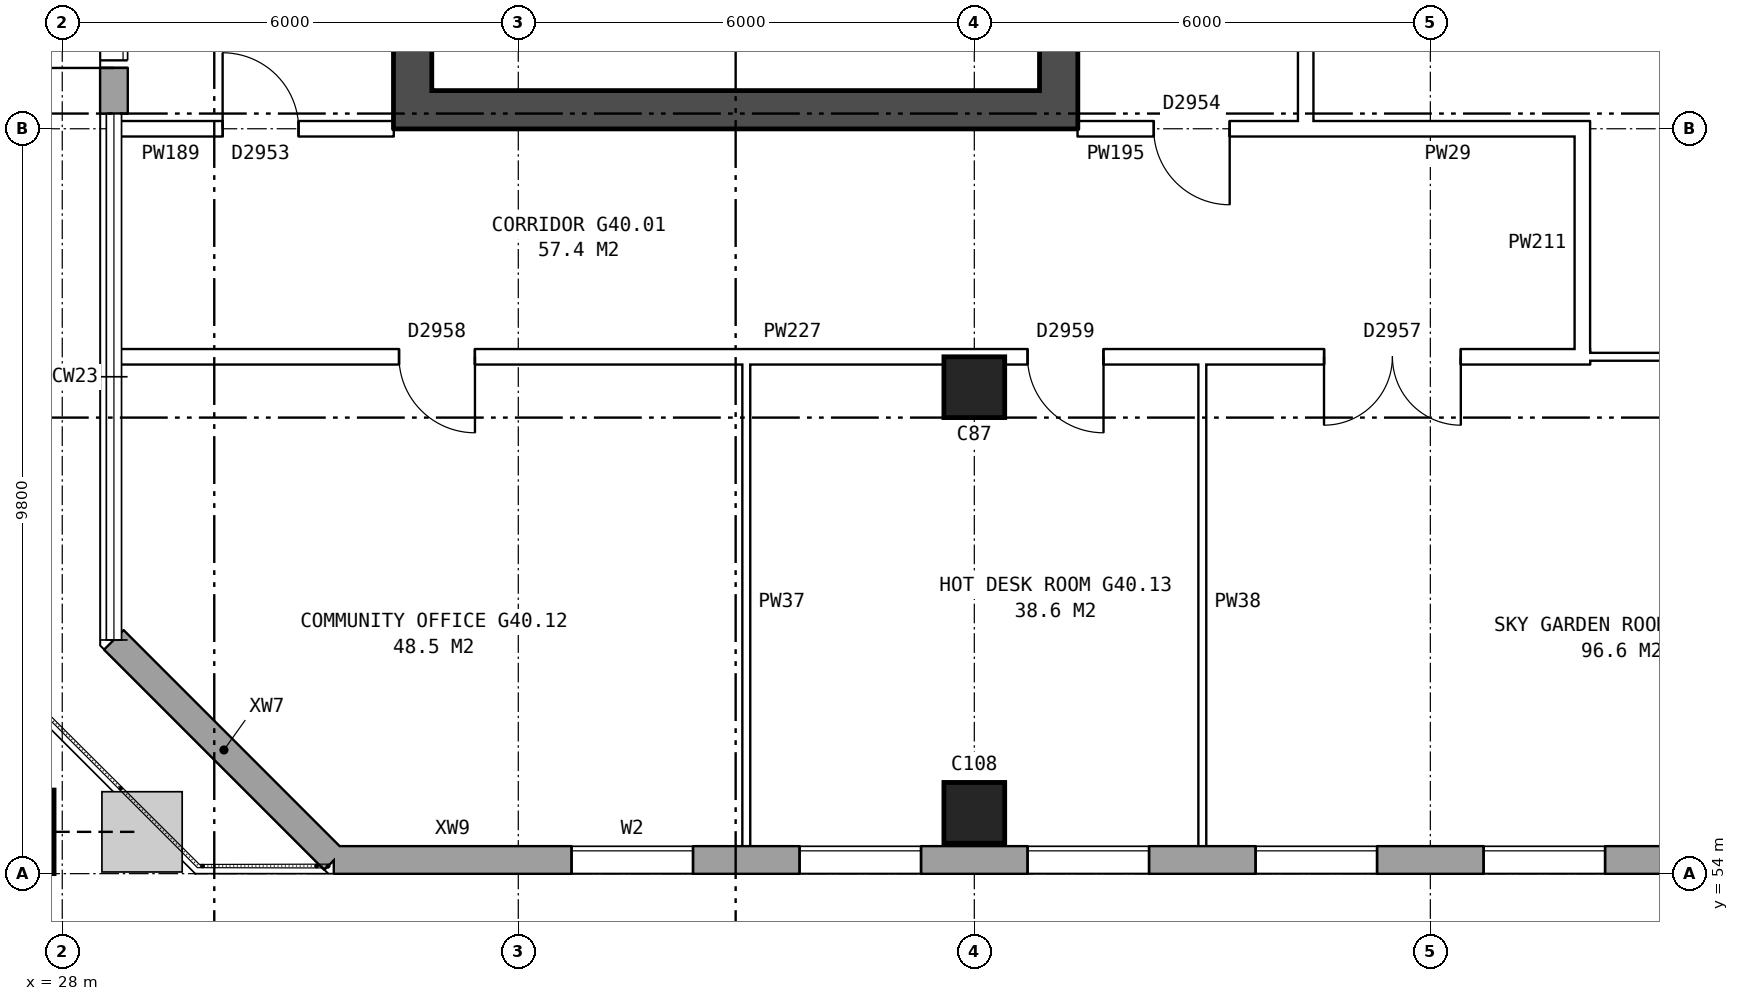
"""IFC4 building model, lengths in metres.
Left out: names, types, materials, properties, quantities, classifications, styles, units other than length and angle.
Written with IfcOpenShell. Run it as: python <this file> out.ifc"""

import sys

from ifc_helpers import new_model, si_unit, direction, frame, frame_2d, origin, origin_2d, place, context, subcontext, project, spatial, rectangle, hollow_rectangle, extrude, element, fill, save


model = new_model("IFC4")
c1 = context("Model", 3, precision=1e-05, world=origin(), true_north=direction((0.0, 1.0)))
c2 = subcontext(c1, "Body", "Model", "MODEL_VIEW")
j1 = project(units=[si_unit("LENGTHUNIT", "METRE"), si_unit("PLANEANGLEUNIT", "RADIAN")], contexts=[c1])
p1 = place(None, origin())
s1 = spatial("IfcSite", under=j1, at=p1, CompositionType="ELEMENT")
p2 = place(p1, origin())
s2 = spatial("IfcBuilding", under=s1, at=p2, CompositionType="ELEMENT")
p3 = place(p2, frame((0.0, 0.0, 142.3)))
s3 = spatial("IfcBuildingStorey", under=s2, at=p3, CompositionType="ELEMENT", Elevation=142.3)
for number, where, z_axis, x_axis in (
    (1, (40.0, 54.8, 0.0), (0.0, 0.0, 1.0), (1.0, 0.0, 0.0)),
    (2, (40.0, 60.4, 0.0), (0.0, 0.0, 1.0), (1.0, 0.0, 0.0)),
):
    element("IfcColumn", number, at=place(p3, frame(where, z_axis=z_axis, x_axis=x_axis)), inside=s3, PredefinedType="COLUMN", context=c2, shape_type="SweptSolid", body=[
        extrude(rectangle(XDim=0.8, YDim=0.8, at=origin_2d()), origin(), (0.0, 0.0, 1.0), 5.6),
    ])
p4 = place(p3, frame((27.342, 54.55, 0.149), z_axis=(0.27162754988, 0.0, 0.962402449158), x_axis=(0.0, 1.0, 0.0)))
e3 = element("IfcColumn", 3, at=p4, inside=s3, PredefinedType="COLUMN", context=c2, shape_type="SweptSolid", body=[
    extrude(hollow_rectangle(XDim=1.1, YDim=1.1, WallThickness=0.06, at=origin_2d()), origin(), (0.0, 0.0, 1.0), 6.132),
])
p5 = place(p3, frame((28.68, 57.075, 0.0), z_axis=(0.0, 0.0, 1.0), x_axis=(0.707106781187, -0.707106781187, 0.0)))
e4 = element("IfcWall", 4, at=p5, inside=s3, PredefinedType="STANDARD", context=c2, shape_type="SweptSolid", body=[
    extrude(rectangle(XDim=4.094, YDim=0.36, at=frame_2d((2.047, 0.0))), origin(), (0.0, 0.0, 1.0), 5.6),
])
p6 = place(p3, frame((31.575, 54.18, 0.0), z_axis=(0.0, 0.0, 1.0), x_axis=(1.0, 0.0, 0.0)))
e5 = element("IfcWall", 5, at=p6, inside=s3, PredefinedType="STANDARD", context=c2, shape_type="SweptSolid", body=[
    extrude(rectangle(XDim=41.351, YDim=0.36, at=frame_2d((20.675, 0.0))), origin(), (0.0, 0.0, 1.0), 5.6),
])
p7 = place(p6, frame((3.125, 0.0, 0.15)))
e6 = element("IfcOpeningElement", 6, at=p7, cuts=e5, PredefinedType="OPENING", context=c2, shape_type="SweptSolid", body=[
    extrude(rectangle(XDim=1.6, YDim=2.4, at=frame_2d((0.8, 1.2))), frame((0.0, 0.19, 0.0), z_axis=(0.0, -1.0, 0.0), x_axis=(1.0, 0.0, 0.0)), (0.0, 0.0, 1.0), 0.38),
])
p8 = place(p6, frame((6.125, 0.0, 0.15)))
e7 = element("IfcOpeningElement", 7, at=p8, cuts=e5, PredefinedType="OPENING", context=c2, shape_type="SweptSolid", body=[
    extrude(rectangle(XDim=1.6, YDim=2.4, at=frame_2d((0.8, 1.2))), frame((0.0, 0.19, 0.0), z_axis=(0.0, -1.0, 0.0), x_axis=(1.0, 0.0, 0.0)), (0.0, 0.0, 1.0), 0.38),
])
p9 = place(p6, frame((9.125, 0.0, 0.15)))
e8 = element("IfcOpeningElement", 8, at=p9, cuts=e5, PredefinedType="OPENING", context=c2, shape_type="SweptSolid", body=[
    extrude(rectangle(XDim=1.6, YDim=2.4, at=frame_2d((0.8, 1.2))), frame((0.0, 0.19, 0.0), z_axis=(0.0, -1.0, 0.0), x_axis=(1.0, 0.0, 0.0)), (0.0, 0.0, 1.0), 0.38),
])
p10 = place(p6, frame((12.125, 0.0, 0.15)))
e9 = element("IfcOpeningElement", 9, at=p10, cuts=e5, PredefinedType="OPENING", context=c2, shape_type="SweptSolid", body=[
    extrude(rectangle(XDim=1.6, YDim=2.4, at=frame_2d((0.8, 1.2))), frame((0.0, 0.19, 0.0), z_axis=(0.0, -1.0, 0.0), x_axis=(1.0, 0.0, 0.0)), (0.0, 0.0, 1.0), 0.38),
])
p11 = place(p6, frame((15.125, 0.0, 0.15)))
e10 = element("IfcOpeningElement", 10, at=p11, cuts=e5, PredefinedType="OPENING", context=c2, shape_type="SweptSolid", body=[
    extrude(rectangle(XDim=1.6, YDim=2.4, at=frame_2d((0.8, 1.2))), frame((0.0, 0.19, 0.0), z_axis=(0.0, -1.0, 0.0), x_axis=(1.0, 0.0, 0.0)), (0.0, 0.0, 1.0), 0.38),
])
p12 = place(p6, frame((18.125, 0.0, 0.15)))
e11 = element("IfcOpeningElement", 11, at=p12, cuts=e5, PredefinedType="OPENING", context=c2, shape_type="SweptSolid", body=[
    extrude(rectangle(XDim=1.6, YDim=2.4, at=frame_2d((0.8, 1.2))), frame((0.0, 0.19, 0.0), z_axis=(0.0, -1.0, 0.0), x_axis=(1.0, 0.0, 0.0)), (0.0, 0.0, 1.0), 0.38),
])
p13 = place(p6, frame((21.125, 0.0, 0.15)))
e12 = element("IfcOpeningElement", 12, at=p13, cuts=e5, PredefinedType="OPENING", context=c2, shape_type="SweptSolid", body=[
    extrude(rectangle(XDim=1.6, YDim=2.4, at=frame_2d((0.8, 1.2))), frame((0.0, 0.19, 0.0), z_axis=(0.0, -1.0, 0.0), x_axis=(1.0, 0.0, 0.0)), (0.0, 0.0, 1.0), 0.38),
])
p14 = place(p6, frame((24.125, 0.0, 0.15)))
e13 = element("IfcOpeningElement", 13, at=p14, cuts=e5, PredefinedType="OPENING", context=c2, shape_type="SweptSolid", body=[
    extrude(rectangle(XDim=1.6, YDim=2.4, at=frame_2d((0.8, 1.2))), frame((0.0, 0.19, 0.0), z_axis=(0.0, -1.0, 0.0), x_axis=(1.0, 0.0, 0.0)), (0.0, 0.0, 1.0), 0.38),
])
p15 = place(p6, frame((27.125, 0.0, 0.15)))
e14 = element("IfcOpeningElement", 14, at=p15, cuts=e5, PredefinedType="OPENING", context=c2, shape_type="SweptSolid", body=[
    extrude(rectangle(XDim=1.6, YDim=2.4, at=frame_2d((0.8, 1.2))), frame((0.0, 0.19, 0.0), z_axis=(0.0, -1.0, 0.0), x_axis=(1.0, 0.0, 0.0)), (0.0, 0.0, 1.0), 0.38),
])
p16 = place(p6, frame((30.125, 0.0, 0.15)))
e15 = element("IfcOpeningElement", 15, at=p16, cuts=e5, PredefinedType="OPENING", context=c2, shape_type="SweptSolid", body=[
    extrude(rectangle(XDim=1.6, YDim=2.4, at=frame_2d((0.8, 1.2))), frame((0.0, 0.19, 0.0), z_axis=(0.0, -1.0, 0.0), x_axis=(1.0, 0.0, 0.0)), (0.0, 0.0, 1.0), 0.38),
])
p17 = place(p6, frame((33.125, 0.0, 0.15)))
e16 = element("IfcOpeningElement", 16, at=p17, cuts=e5, PredefinedType="OPENING", context=c2, shape_type="SweptSolid", body=[
    extrude(rectangle(XDim=1.6, YDim=2.4, at=frame_2d((0.8, 1.2))), frame((0.0, 0.19, 0.0), z_axis=(0.0, -1.0, 0.0), x_axis=(1.0, 0.0, 0.0)), (0.0, 0.0, 1.0), 0.38),
])
p18 = place(p6, frame((36.125, 0.0, 0.15)))
e17 = element("IfcOpeningElement", 17, at=p18, cuts=e5, PredefinedType="OPENING", context=c2, shape_type="SweptSolid", body=[
    extrude(rectangle(XDim=1.6, YDim=2.4, at=frame_2d((0.8, 1.2))), frame((0.0, 0.19, 0.0), z_axis=(0.0, -1.0, 0.0), x_axis=(1.0, 0.0, 0.0)), (0.0, 0.0, 1.0), 0.38),
])
p19 = place(p6, frame((39.125, 0.0, 0.15)))
e18 = element("IfcOpeningElement", 18, at=p19, cuts=e5, PredefinedType="OPENING", context=c2, shape_type="SweptSolid", body=[
    extrude(rectangle(XDim=1.6, YDim=2.4, at=frame_2d((0.8, 1.2))), frame((0.0, 0.19, 0.0), z_axis=(0.0, -1.0, 0.0), x_axis=(1.0, 0.0, 0.0)), (0.0, 0.0, 1.0), 0.38),
])
p20 = place(p3, frame((28.68, 67.0, 0.0), z_axis=(0.0, 0.0, 1.0), x_axis=(0.0, -1.0, 0.0)))
e19 = element("IfcWall", 19, at=p20, inside=s3, PredefinedType="STANDARD", context=c2, shape_type="SweptSolid", body=[
    extrude(rectangle(XDim=3.0, YDim=0.36, at=frame_2d((1.5, 0.0))), origin(), (0.0, 0.0, 1.0), 5.6),
])
p21 = place(p20, frame((0.7, 0.0, 3.4)))
e20 = element("IfcOpeningElement", 20, at=p21, cuts=e19, PredefinedType="OPENING", context=c2, shape_type="SweptSolid", body=[
    extrude(rectangle(XDim=1.6, YDim=1.2, at=frame_2d((0.8, 0.6))), frame((0.0, 0.19, 0.0), z_axis=(0.0, -1.0, 0.0), x_axis=(1.0, 0.0, 0.0)), (0.0, 0.0, 1.0), 0.38),
])
p22 = place(p20, frame((0.6, 0.0, 0.0)))
e21 = element("IfcOpeningElement", 21, at=p22, cuts=e19, PredefinedType="OPENING", context=c2, shape_type="SweptSolid", body=[
    extrude(rectangle(XDim=1.8, YDim=2.4, at=frame_2d((0.9, 1.2))), frame((0.0, 0.19, 0.0), z_axis=(0.0, -1.0, 0.0), x_axis=(1.0, 0.0, 0.0)), (0.0, 0.0, 1.0), 0.38),
])
p23 = place(p3, frame((41.11, 76.2, 0.0), z_axis=(0.0, 0.0, 1.0), x_axis=(0.0, -1.0, 0.0)))
e22 = element("IfcWall", 22, at=p23, inside=s3, PredefinedType="SHEAR", context=c2, shape_type="SweptSolid", body=[
    extrude(rectangle(XDim=12.4, YDim=0.5, at=frame_2d((6.2, 0.0))), origin(), (0.0, 0.0, 1.0), 5.6),
])
p24 = place(p23, frame((1.325, 0.0, 0.0)))
e23 = element("IfcOpeningElement", 23, at=p24, cuts=e22, PredefinedType="OPENING", context=c2, shape_type="SweptSolid", body=[
    extrude(rectangle(XDim=1.1, YDim=2.1, at=frame_2d((0.55, 1.05))), frame((0.0, 0.26, 0.0), z_axis=(0.0, -1.0, 0.0), x_axis=(1.0, 0.0, 0.0)), (0.0, 0.0, 1.0), 0.52),
])
p25 = place(p23, frame((5.925, 0.0, 0.0)))
e24 = element("IfcOpeningElement", 24, at=p25, cuts=e22, PredefinedType="OPENING", context=c2, shape_type="SweptSolid", body=[
    extrude(rectangle(XDim=0.85, YDim=2.1, at=frame_2d((0.425, 1.05))), frame((0.0, 0.26, 0.0), z_axis=(0.0, -1.0, 0.0), x_axis=(1.0, 0.0, 0.0)), (0.0, 0.0, 1.0), 0.52),
])
p26 = place(p23, frame((9.9, 0.0, 0.0)))
e25 = element("IfcOpeningElement", 25, at=p26, cuts=e22, PredefinedType="OPENING", context=c2, shape_type="SweptSolid", body=[
    extrude(rectangle(XDim=1.1, YDim=2.1, at=frame_2d((0.55, 1.05))), frame((0.0, 0.26, 0.0), z_axis=(0.0, -1.0, 0.0), x_axis=(1.0, 0.0, 0.0)), (0.0, 0.0, 1.0), 0.52),
])
p27 = place(p3, frame((32.61, 76.2, 0.0), z_axis=(0.0, 0.0, 1.0), x_axis=(0.0, -1.0, 0.0)))
e26 = element("IfcWall", 26, at=p27, inside=s3, PredefinedType="SHEAR", context=c2, shape_type="SweptSolid", body=[
    extrude(rectangle(XDim=12.4, YDim=0.5, at=frame_2d((6.2, 0.0))), origin(), (0.0, 0.0, 1.0), 5.6),
])
p28 = place(p3, frame((40.86, 64.05, 0.0), z_axis=(0.0, 0.0, 1.0), x_axis=(-1.0, 0.0, 0.0)))
e27 = element("IfcWall", 27, at=p28, inside=s3, PredefinedType="SHEAR", context=c2, shape_type="SweptSolid", body=[
    extrude(rectangle(XDim=8.0, YDim=0.5, at=frame_2d((4.0, 0.0))), origin(), (0.0, 0.0, 1.0), 5.6),
])
p29 = place(p3, frame((44.36, 63.9, 0.0), z_axis=(0.0, 0.0, 1.0), x_axis=(0.0, 1.0, 0.0)))
e28 = element("IfcWall", 28, at=p29, inside=s3, PredefinedType="PARTITIONING", context=c2, shape_type="SweptSolid", body=[
    extrude(rectangle(XDim=12.2, YDim=0.2, at=frame_2d((6.1, 0.0))), origin(), (0.0, 0.0, 1.0), 5.6),
])
p30 = place(p29, frame((5.1, 0.0, 0.0)))
e29 = element("IfcOpeningElement", 29, at=p30, cuts=e28, PredefinedType="OPENING", context=c2, shape_type="SweptSolid", body=[
    extrude(rectangle(XDim=2.0, YDim=2.1, at=frame_2d((1.0, 1.05))), frame((0.0, 0.11, 0.0), z_axis=(0.0, -1.0, 0.0), x_axis=(1.0, 0.0, 0.0)), (0.0, 0.0, 1.0), 0.22),
])
p31 = place(p3, frame((28.74, 60.8, 0.0), z_axis=(0.0, 0.0, 1.0), x_axis=(1.0, 0.0, 0.0)))
e30 = element("IfcWall", 30, at=p31, inside=s3, PredefinedType="PARTITIONING", context=c2, shape_type="SweptSolid", body=[
    extrude(rectangle(XDim=19.362, YDim=0.2, at=frame_2d((9.681, 0.0))), origin(), (0.0, 0.0, 1.0), 5.6),
])
p32 = place(p31, frame((3.69, 0.0, 0.0)))
e31 = element("IfcOpeningElement", 31, at=p32, cuts=e30, PredefinedType="OPENING", context=c2, shape_type="SweptSolid", body=[
    extrude(rectangle(XDim=1.0, YDim=2.1, at=frame_2d((0.5, 1.05))), frame((0.0, 0.11, 0.0), z_axis=(0.0, -1.0, 0.0), x_axis=(1.0, 0.0, 0.0)), (0.0, 0.0, 1.0), 0.22),
])
p33 = place(p31, frame((11.96, 0.0, 0.0)))
e32 = element("IfcOpeningElement", 32, at=p33, cuts=e30, PredefinedType="OPENING", context=c2, shape_type="SweptSolid", body=[
    extrude(rectangle(XDim=1.0, YDim=2.1, at=frame_2d((0.5, 1.05))), frame((0.0, 0.11, 0.0), z_axis=(0.0, -1.0, 0.0), x_axis=(1.0, 0.0, 0.0)), (0.0, 0.0, 1.0), 0.22),
])
p34 = place(p31, frame((15.861, 0.0, 0.0)))
e33 = element("IfcOpeningElement", 33, at=p34, cuts=e30, PredefinedType="OPENING", context=c2, shape_type="SweptSolid", body=[
    extrude(rectangle(XDim=1.8, YDim=2.1, at=frame_2d((0.9, 1.05))), frame((0.0, 0.11, 0.0), z_axis=(0.0, -1.0, 0.0), x_axis=(1.0, 0.0, 0.0)), (0.0, 0.0, 1.0), 0.22),
])
p35 = place(p3, frame((47.9, 60.8, 0.0), z_axis=(0.0, 0.0, 1.0), x_axis=(1.0, 0.0, 0.0)))
e34 = element("IfcWall", 34, at=p35, inside=s3, PredefinedType="PARTITIONING", context=c2, shape_type="SweptSolid", body=[
    extrude(rectangle(XDim=10.15, YDim=0.1, at=frame_2d((5.075, 0.0))), origin(), (0.0, 0.0, 1.0), 5.6),
])
p36 = place(p35, frame((4.8, 0.0, 0.0)))
e35 = element("IfcOpeningElement", 35, at=p36, cuts=e34, PredefinedType="OPENING", context=c2, shape_type="SweptSolid", body=[
    extrude(rectangle(XDim=1.0, YDim=2.1, at=frame_2d((0.5, 1.05))), frame((0.0, 0.06, 0.0), z_axis=(0.0, -1.0, 0.0), x_axis=(1.0, 0.0, 0.0)), (0.0, 0.0, 1.0), 0.12),
])
p37 = place(p3, frame((28.74, 63.8, 0.0), z_axis=(0.0, 0.0, 1.0), x_axis=(1.0, 0.0, 0.0)))
e36 = element("IfcWall", 36, at=p37, inside=s3, PredefinedType="PARTITIONING", context=c2, shape_type="SweptSolid", body=[
    extrude(rectangle(XDim=3.62, YDim=0.2, at=frame_2d((1.81, 0.0))), origin(), (0.0, 0.0, 1.0), 5.6),
])
p38 = place(p37, frame((1.37, 0.0, 0.0)))
e37 = element("IfcOpeningElement", 37, at=p38, cuts=e36, PredefinedType="OPENING", context=c2, shape_type="SweptSolid", body=[
    extrude(rectangle(XDim=1.0, YDim=2.1, at=frame_2d((0.5, 1.05))), frame((0.0, 0.11, 0.0), z_axis=(0.0, -1.0, 0.0), x_axis=(1.0, 0.0, 0.0)), (0.0, 0.0, 1.0), 0.22),
])
p39 = place(p3, frame((44.36, 63.8, 0.0), z_axis=(0.0, 0.0, 1.0), x_axis=(1.0, 0.0, 0.0)))
e38 = element("IfcWall", 38, at=p39, inside=s3, PredefinedType="PARTITIONING", context=c2, shape_type="SweptSolid", body=[
    extrude(rectangle(XDim=3.74, YDim=0.2, at=frame_2d((1.87, 0.0))), origin(), (0.0, 0.0, 1.0), 5.6),
])
p40 = place(p3, frame((41.36, 63.8, 0.0), z_axis=(0.0, 0.0, 1.0), x_axis=(1.0, 0.0, 0.0)))
e39 = element("IfcWall", 39, at=p40, inside=s3, PredefinedType="PARTITIONING", context=c2, shape_type="SweptSolid", body=[
    extrude(rectangle(XDim=3.0, YDim=0.2, at=frame_2d((1.5, 0.0))), origin(), (0.0, 0.0, 1.0), 5.6),
])
p41 = place(p40, frame((1.0, 0.0, 0.0)))
e40 = element("IfcOpeningElement", 40, at=p41, cuts=e39, PredefinedType="OPENING", context=c2, shape_type="SweptSolid", body=[
    extrude(rectangle(XDim=1.0, YDim=2.1, at=frame_2d((0.5, 1.05))), frame((0.0, 0.11, 0.0), z_axis=(0.0, -1.0, 0.0), x_axis=(1.0, 0.0, 0.0)), (0.0, 0.0, 1.0), 0.22),
])
for number, where, z_axis, x_axis in (
    (41, (37.0, 54.24, 0.0), (0.0, 0.0, 1.0), (0.0, 1.0, 0.0)),
    (42, (43.0, 54.24, 0.0), (0.0, 0.0, 1.0), (0.0, 1.0, 0.0)),
):
    element("IfcWall", number, at=place(p3, frame(where, z_axis=z_axis, x_axis=x_axis)), inside=s3, PredefinedType="PARTITIONING", context=c2, shape_type="SweptSolid", body=[
        extrude(rectangle(XDim=6.66, YDim=0.1, at=frame_2d((3.33, 0.0))), origin(), (0.0, 0.0, 1.0), 5.6),
    ])
p42 = place(p3, frame((48.0, 60.7, 0.0), z_axis=(0.0, 0.0, 1.0), x_axis=(0.0, 1.0, 0.0)))
e43 = element("IfcWall", 43, at=p42, inside=s3, PredefinedType="PARTITIONING", context=c2, shape_type="SweptSolid", body=[
    extrude(rectangle(XDim=3.2, YDim=0.2, at=frame_2d((1.6, 0.0))), origin(), (0.0, 0.0, 1.0), 5.6),
])
p43 = place(p7, origin())
e44 = element("IfcWindow", 44, at=p43, inside=s3, PartitioningType="SINGLE_PANEL", PredefinedType="WINDOW", context=c2, shape_type="SweptSolid", body=[
    extrude(rectangle(XDim=1.6, YDim=2.4, at=frame_2d((0.8, 1.2))), frame((0.0, 0.15, 0.0), z_axis=(0.0, -1.0, 0.0), x_axis=(1.0, 0.0, 0.0)), (0.0, 0.0, 1.0), 0.06),
])
fill(e6, e44)
p44 = place(p8, origin())
e45 = element("IfcWindow", 45, at=p44, inside=s3, PartitioningType="SINGLE_PANEL", PredefinedType="WINDOW", context=c2, shape_type="SweptSolid", body=[
    extrude(rectangle(XDim=1.6, YDim=2.4, at=frame_2d((0.8, 1.2))), frame((0.0, 0.15, 0.0), z_axis=(0.0, -1.0, 0.0), x_axis=(1.0, 0.0, 0.0)), (0.0, 0.0, 1.0), 0.06),
])
fill(e7, e45)
p45 = place(p9, origin())
e46 = element("IfcWindow", 46, at=p45, inside=s3, PartitioningType="SINGLE_PANEL", PredefinedType="WINDOW", context=c2, shape_type="SweptSolid", body=[
    extrude(rectangle(XDim=1.6, YDim=2.4, at=frame_2d((0.8, 1.2))), frame((0.0, 0.15, 0.0), z_axis=(0.0, -1.0, 0.0), x_axis=(1.0, 0.0, 0.0)), (0.0, 0.0, 1.0), 0.06),
])
fill(e8, e46)
p46 = place(p10, origin())
e47 = element("IfcWindow", 47, at=p46, inside=s3, PartitioningType="SINGLE_PANEL", PredefinedType="WINDOW", context=c2, shape_type="SweptSolid", body=[
    extrude(rectangle(XDim=1.6, YDim=2.4, at=frame_2d((0.8, 1.2))), frame((0.0, 0.15, 0.0), z_axis=(0.0, -1.0, 0.0), x_axis=(1.0, 0.0, 0.0)), (0.0, 0.0, 1.0), 0.06),
])
fill(e9, e47)
p47 = place(p11, origin())
e48 = element("IfcWindow", 48, at=p47, inside=s3, PartitioningType="SINGLE_PANEL", PredefinedType="WINDOW", context=c2, shape_type="SweptSolid", body=[
    extrude(rectangle(XDim=1.6, YDim=2.4, at=frame_2d((0.8, 1.2))), frame((0.0, 0.15, 0.0), z_axis=(0.0, -1.0, 0.0), x_axis=(1.0, 0.0, 0.0)), (0.0, 0.0, 1.0), 0.06),
])
fill(e10, e48)
p48 = place(p21, origin())
e49 = element("IfcWindow", 49, at=p48, inside=s3, PartitioningType="DOUBLE_PANEL_HORIZONTAL", PredefinedType="WINDOW", context=c2, shape_type="SweptSolid", body=[
    extrude(rectangle(XDim=1.6, YDim=1.2, at=frame_2d((0.8, 0.6))), frame((0.0, 0.15, 0.0), z_axis=(0.0, -1.0, 0.0), x_axis=(1.0, 0.0, 0.0)), (0.0, 0.0, 1.0), 0.06),
])
fill(e20, e49)
p49 = place(p22, frame((1.8, 0.0, 0.0), z_axis=(0.0, 0.0, 1.0), x_axis=(-1.0, 0.0, 0.0)))
e50 = element("IfcDoor", 50, at=p49, inside=s3, OperationType="DOUBLE_DOOR_SINGLE_SWING", PredefinedType="DOOR", context=c2, shape_type="SweptSolid", body=[
    extrude(rectangle(XDim=1.8, YDim=2.4, at=frame_2d((0.9, 1.2))), frame((0.0, 0.025, 0.0), z_axis=(0.0, -1.0, 0.0), x_axis=(1.0, 0.0, 0.0)), (0.0, 0.0, 1.0), 0.05),
])
fill(e21, e50)
p50 = place(p32, frame((1.0, 0.0, 0.0), z_axis=(0.0, 0.0, 1.0), x_axis=(-1.0, 0.0, 0.0)))
e51 = element("IfcDoor", 51, at=p50, inside=s3, OperationType="SINGLE_SWING_LEFT", PredefinedType="DOOR", context=c2, shape_type="SweptSolid", body=[
    extrude(rectangle(XDim=1.0, YDim=2.1, at=frame_2d((0.5, 1.05))), frame((0.0, 0.025, 0.0), z_axis=(0.0, -1.0, 0.0), x_axis=(1.0, 0.0, 0.0)), (0.0, 0.0, 1.0), 0.05),
])
fill(e31, e51)
p51 = place(p33, frame((1.0, 0.0, 0.0), z_axis=(0.0, 0.0, 1.0), x_axis=(-1.0, 0.0, 0.0)))
e52 = element("IfcDoor", 52, at=p51, inside=s3, OperationType="SINGLE_SWING_LEFT", PredefinedType="DOOR", context=c2, shape_type="SweptSolid", body=[
    extrude(rectangle(XDim=1.0, YDim=2.1, at=frame_2d((0.5, 1.05))), frame((0.0, 0.025, 0.0), z_axis=(0.0, -1.0, 0.0), x_axis=(1.0, 0.0, 0.0)), (0.0, 0.0, 1.0), 0.05),
])
fill(e32, e52)
p52 = place(p34, frame((1.8, 0.0, 0.0), z_axis=(0.0, 0.0, 1.0), x_axis=(-1.0, 0.0, 0.0)))
e53 = element("IfcDoor", 53, at=p52, inside=s3, OperationType="DOUBLE_DOOR_SINGLE_SWING", PredefinedType="DOOR", context=c2, shape_type="SweptSolid", body=[
    extrude(rectangle(XDim=1.8, YDim=2.1, at=frame_2d((0.9, 1.05))), frame((0.0, 0.025, 0.0), z_axis=(0.0, -1.0, 0.0), x_axis=(1.0, 0.0, 0.0)), (0.0, 0.0, 1.0), 0.05),
])
fill(e33, e53)
p53 = place(p38, origin())
e54 = element("IfcDoor", 54, at=p53, inside=s3, OperationType="SINGLE_SWING_LEFT", PredefinedType="DOOR", context=c2, shape_type="SweptSolid", body=[
    extrude(rectangle(XDim=1.0, YDim=2.1, at=frame_2d((0.5, 1.05))), frame((0.0, 0.025, 0.0), z_axis=(0.0, -1.0, 0.0), x_axis=(1.0, 0.0, 0.0)), (0.0, 0.0, 1.0), 0.05),
])
fill(e37, e54)
p54 = place(p41, frame((1.0, 0.0, 0.0), z_axis=(0.0, 0.0, 1.0), x_axis=(-1.0, 0.0, 0.0)))
e55 = element("IfcDoor", 55, at=p54, inside=s3, OperationType="SINGLE_SWING_LEFT", PredefinedType="DOOR", context=c2, shape_type="SweptSolid", body=[
    extrude(rectangle(XDim=1.0, YDim=2.1, at=frame_2d((0.5, 1.05))), frame((0.0, 0.025, 0.0), z_axis=(0.0, -1.0, 0.0), x_axis=(1.0, 0.0, 0.0)), (0.0, 0.0, 1.0), 0.05),
])
fill(e40, e55)
save(model, sys.argv[1])
